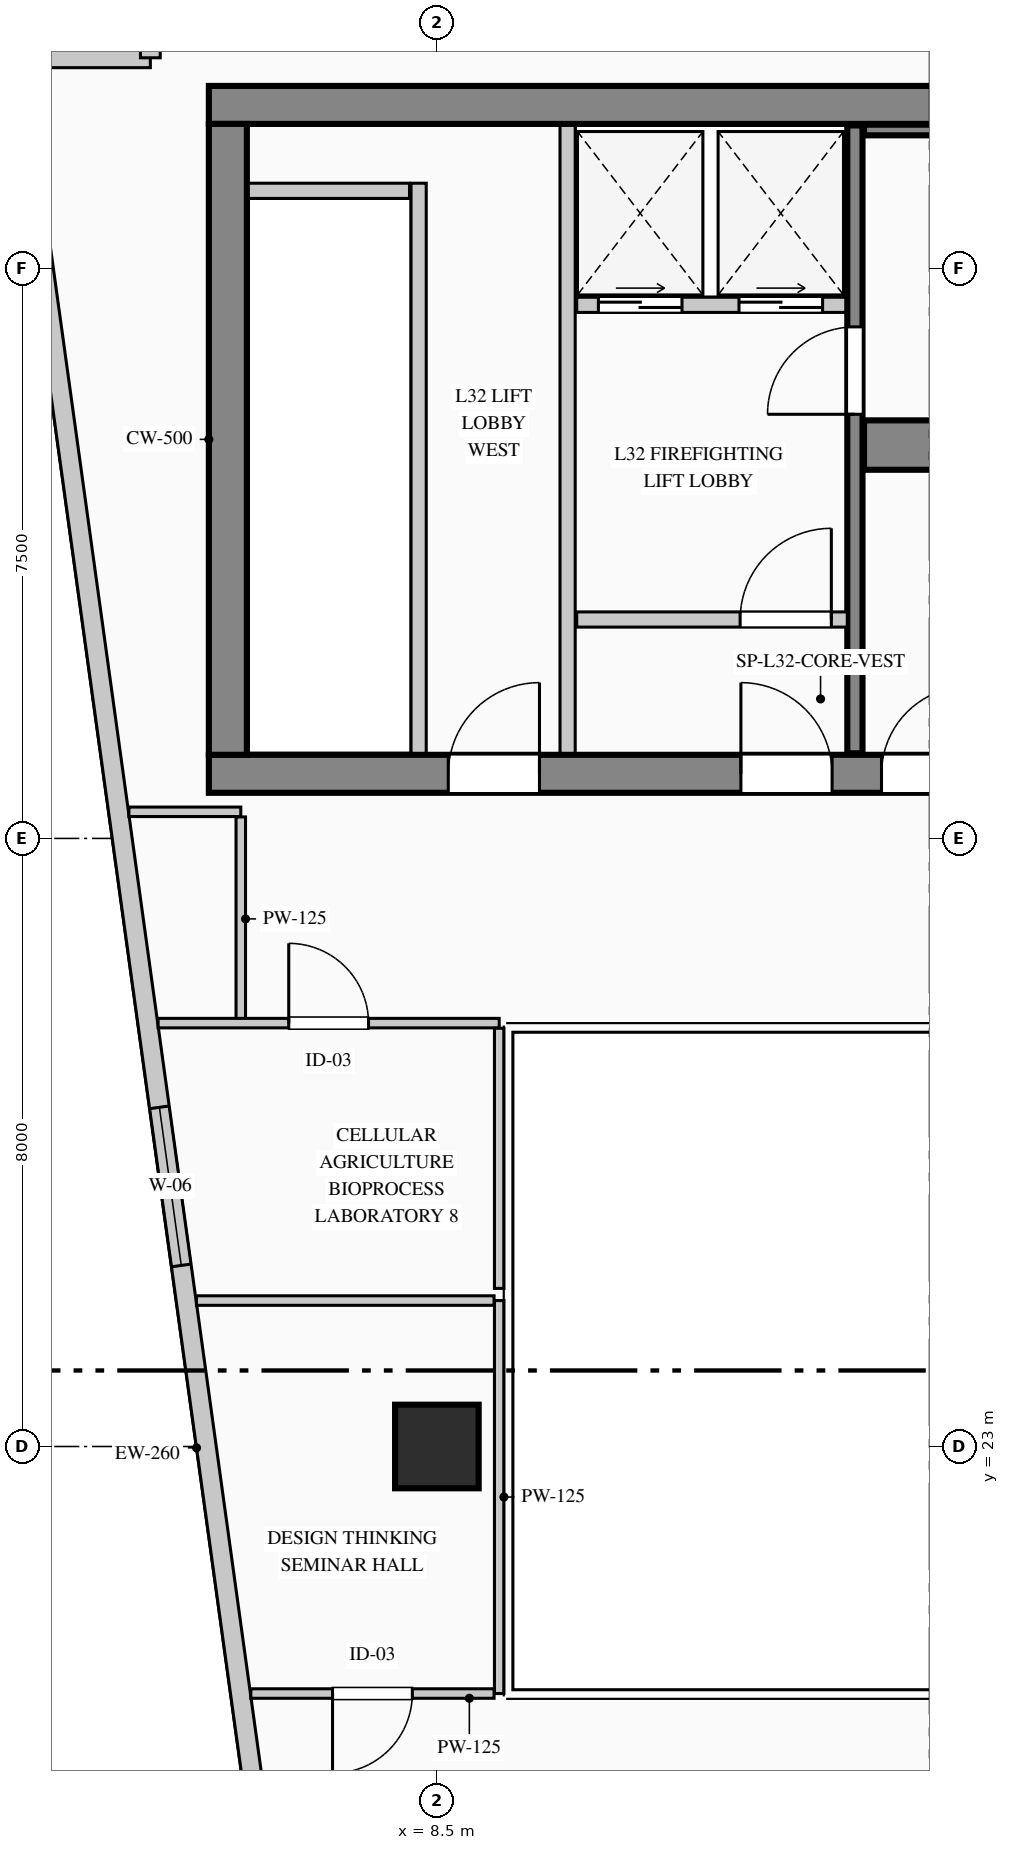
"""IFC4 building model, lengths in metres.
Left out: names, types, materials, properties, quantities, classifications, styles, units other than length and angle.
Written with IfcOpenShell. Run it as: python <this file> out.ifc"""

import sys

from ifc_helpers import new_model, si_unit, direction, frame, frame_2d, origin, origin_2d, place, context, subcontext, project, spatial, rectangle, extrude, element, fill, save


model = new_model("IFC4")
c1 = context("Model", 3, precision=1e-05, world=origin(), true_north=direction((0.0, 1.0)))
c2 = subcontext(c1, "Body", "Model", "MODEL_VIEW")
j1 = project(units=[si_unit("LENGTHUNIT", "METRE"), si_unit("PLANEANGLEUNIT", "RADIAN")], contexts=[c1])
p1 = place(None, origin())
s1 = spatial("IfcSite", under=j1, at=p1, CompositionType="ELEMENT")
p2 = place(p1, origin())
s2 = spatial("IfcBuilding", under=s1, at=p2, CompositionType="ELEMENT")
p3 = place(p2, frame((0.0, 0.0, 139.05)))
s3 = spatial("IfcBuildingStorey", under=s2, at=p3, CompositionType="ELEMENT", Elevation=139.05)
p4 = place(p3, frame((5.5, 40.65, 0.0), z_axis=(0.0, 0.0, 1.0), x_axis=(1.0, 0.0, 0.0)))
e1 = element("IfcWall", 1, at=p4, inside=s3, PredefinedType="SHEAR", context=c2, shape_type="SweptSolid", body=[
    extrude(rectangle(XDim=17.85, YDim=0.5, at=frame_2d((8.925, 0.0))), origin(), (0.0, 0.0, 1.0), 3.95),
])
p5 = place(p4, frame((15.945, 0.0, 0.0)))
e2 = element("IfcOpeningElement", 2, at=p5, cuts=e1, PredefinedType="OPENING", context=c2, shape_type="SweptSolid", body=[
    extrude(rectangle(XDim=1.18, YDim=2.25, at=frame_2d((0.59, 1.125))), frame((0.0, 0.26, 0.0), z_axis=(0.0, -1.0, 0.0), x_axis=(1.0, 0.0, 0.0)), (0.0, 0.0, 1.0), 0.52),
])
p6 = place(p3, frame((5.5, 31.85, 0.0), z_axis=(0.0, 0.0, 1.0), x_axis=(1.0, 0.0, 0.0)))
e3 = element("IfcWall", 3, at=p6, inside=s3, PredefinedType="SHEAR", context=c2, shape_type="SweptSolid", body=[
    extrude(rectangle(XDim=17.85, YDim=0.5, at=frame_2d((8.925, 0.0))), origin(), (0.0, 0.0, 1.0), 3.95),
])
p7 = place(p6, frame((3.15, 0.0, 0.0)))
e4 = element("IfcOpeningElement", 4, at=p7, cuts=e3, PredefinedType="OPENING", context=c2, shape_type="SweptSolid", body=[
    extrude(rectangle(XDim=1.2, YDim=2.2, at=frame_2d((0.6, 1.1))), frame((0.0, 0.26, 0.0), z_axis=(0.0, -1.0, 0.0), x_axis=(1.0, 0.0, 0.0)), (0.0, 0.0, 1.0), 0.52),
])
p8 = place(p6, frame((7.0, 0.0, 0.0)))
e5 = element("IfcOpeningElement", 5, at=p8, cuts=e3, PredefinedType="OPENING", context=c2, shape_type="SweptSolid", body=[
    extrude(rectangle(XDim=1.2, YDim=2.2, at=frame_2d((0.6, 1.1))), frame((0.0, 0.26, 0.0), z_axis=(0.0, -1.0, 0.0), x_axis=(1.0, 0.0, 0.0)), (0.0, 0.0, 1.0), 0.52),
])
p9 = place(p6, frame((8.85, 0.0, 0.0)))
e6 = element("IfcOpeningElement", 6, at=p9, cuts=e3, PredefinedType="OPENING", context=c2, shape_type="SweptSolid", body=[
    extrude(rectangle(XDim=1.15, YDim=2.2, at=frame_2d((0.575, 1.1))), frame((0.0, 0.26, 0.0), z_axis=(0.0, -1.0, 0.0), x_axis=(1.0, 0.0, 0.0)), (0.0, 0.0, 1.0), 0.52),
])
p10 = place(p6, frame((15.95, 0.0, 0.0)))
e7 = element("IfcOpeningElement", 7, at=p10, cuts=e3, PredefinedType="OPENING", context=c2, shape_type="SweptSolid", body=[
    extrude(rectangle(XDim=1.2, YDim=2.2, at=frame_2d((0.6, 1.1))), frame((0.0, 0.26, 0.0), z_axis=(0.0, -1.0, 0.0), x_axis=(1.0, 0.0, 0.0)), (0.0, 0.0, 1.0), 0.52),
])
p11 = place(p3, frame((5.75, 32.1, 0.0), z_axis=(0.0, 0.0, 1.0), x_axis=(0.0, 1.0, 0.0)))
e8 = element("IfcWall", 8, at=p11, inside=s3, PredefinedType="SHEAR", context=c2, shape_type="SweptSolid", body=[
    extrude(rectangle(XDim=8.3, YDim=0.5, at=frame_2d((4.15, 0.0))), origin(), (0.0, 0.0, 1.0), 3.95),
])
p12 = place(p3, frame((14.0, 32.12, 0.0), z_axis=(0.0, 0.0, 1.0), x_axis=(0.0, 1.0, 0.0)))
e9 = element("IfcWall", 9, at=p12, inside=s3, PredefinedType="SHEAR", context=c2, shape_type="SweptSolid", body=[
    extrude(rectangle(XDim=8.26, YDim=0.2, at=frame_2d((4.13, 0.0))), origin(), (0.0, 0.0, 1.0), 3.95),
])
p13 = place(p12, frame((4.46, 0.0, 0.0)))
e10 = element("IfcOpeningElement", 10, at=p13, cuts=e9, PredefinedType="OPENING", context=c2, shape_type="SweptSolid", body=[
    extrude(rectangle(XDim=1.15, YDim=2.2, at=frame_2d((0.575, 1.1))), frame((0.0, 0.11, 0.0), z_axis=(0.0, -1.0, 0.0), x_axis=(1.0, 0.0, 0.0)), (0.0, 0.0, 1.0), 0.22),
])
p14 = place(p3, frame((14.12, 36.175, 0.0), z_axis=(0.0, 0.0, 1.0), x_axis=(1.0, 0.0, 0.0)))
e11 = element("IfcWall", 11, at=p14, inside=s3, PredefinedType="SHEAR", context=c2, shape_type="SweptSolid", body=[
    extrude(rectangle(XDim=7.01, YDim=0.65, at=frame_2d((3.505, 0.0))), origin(), (0.0, 0.0, 1.0), 3.95),
])
p15 = place(p3, frame((14.12, 40.32, 0.0), z_axis=(0.0, 0.0, 1.0), x_axis=(1.0, 0.0, 0.0)))
e12 = element("IfcWall", 12, at=p15, inside=s3, PredefinedType="SHEAR", context=c2, shape_type="SweptSolid", body=[
    extrude(rectangle(XDim=7.01, YDim=0.14, at=frame_2d((3.505, 0.0))), origin(), (0.0, 0.0, 1.0), 3.95),
])
p16 = place(p3, frame((8.5, 23.0, 0.0), z_axis=(0.0, 0.0, 1.0), x_axis=(1.0, 0.0, 0.0)))
e13 = element("IfcColumn", 13, at=p16, inside=s3, PredefinedType="COLUMN", context=c2, shape_type="SweptSolid", body=[
    extrude(rectangle(XDim=1.1, YDim=1.1, at=origin_2d()), origin(), (0.0, 0.0, 1.0), 3.95),
])
p17 = place(p3, frame((7.993, 4.73, 0.0), z_axis=(0.0, 0.0, 1.0), x_axis=(-0.136989009016, 0.990572567462, 0.0)))
e14 = element("IfcWall", 14, at=p17, inside=s3, PredefinedType="STANDARD", context=c2, shape_type="SweptSolid", body=[
    extrude(rectangle(XDim=36.888, YDim=0.26, at=frame_2d((18.444, 0.0))), origin(), (0.0, 0.0, 1.0), 3.69),
])
p18 = place(p17, frame((20.848, 0.0, 0.9)))
e15 = element("IfcOpeningElement", 15, at=p18, cuts=e14, PredefinedType="OPENING", context=c2, shape_type="SweptSolid", body=[
    extrude(rectangle(XDim=2.1, YDim=2.0, at=frame_2d((1.05, 1.0))), frame((0.0, 0.14, 0.0), z_axis=(0.0, -1.0, 0.0), x_axis=(1.0, 0.0, 0.0)), (0.0, 0.0, 1.0), 0.28),
])
p19 = place(p3, frame((2.94, 41.27, 0.0), z_axis=(0.0, 0.0, 1.0), x_axis=(1.0, 0.0, 0.0)))
e16 = element("IfcWall", 16, at=p19, inside=s3, PredefinedType="STANDARD", context=c2, shape_type="SweptSolid", body=[
    extrude(rectangle(XDim=1.79, YDim=0.26, at=frame_2d((0.895, 0.0))), origin(), (0.0, 0.0, 1.0), 3.69),
])
p20 = place(p3, frame((4.73, 41.27, 0.0), z_axis=(0.0, 0.0, 1.0), x_axis=(0.0, 1.0, 0.0)))
e17 = element("IfcWall", 17, at=p20, inside=s3, PredefinedType="STANDARD", context=c2, shape_type="SweptSolid", body=[
    extrude(rectangle(XDim=2.1, YDim=0.26, at=frame_2d((1.05, 0.0))), origin(), (0.0, 0.0, 1.0), 3.69),
])
p21 = place(p3, frame((8.26, 32.12, 0.0), z_axis=(0.0, 0.0, 1.0), x_axis=(0.0, 1.0, 0.0)))
e18 = element("IfcWall", 18, at=p21, inside=s3, PredefinedType="PARTITIONING", context=c2, shape_type="SweptSolid", body=[
    extrude(rectangle(XDim=7.5, YDim=0.2, at=frame_2d((3.75, 0.0))), origin(), (0.0, 0.0, 1.0), 3.69),
])
p22 = place(p3, frame((6.02, 39.52, 0.0), z_axis=(0.0, 0.0, 1.0), x_axis=(1.0, 0.0, 0.0)))
e19 = element("IfcWall", 19, at=p22, inside=s3, PredefinedType="PARTITIONING", context=c2, shape_type="SweptSolid", body=[
    extrude(rectangle(XDim=2.12, YDim=0.2, at=frame_2d((1.06, 0.0))), origin(), (0.0, 0.0, 1.0), 3.69),
])
p23 = place(p3, frame((10.22, 32.12, 0.0), z_axis=(0.0, 0.0, 1.0), x_axis=(0.0, 1.0, 0.0)))
e20 = element("IfcWall", 20, at=p23, inside=s3, PredefinedType="PARTITIONING", context=c2, shape_type="SweptSolid", body=[
    extrude(rectangle(XDim=8.26, YDim=0.2, at=frame_2d((4.13, 0.0))), origin(), (0.0, 0.0, 1.0), 3.69),
])
p24 = place(p3, frame((10.34, 38.02, 0.0), z_axis=(0.0, 0.0, 1.0), x_axis=(1.0, 0.0, 0.0)))
e21 = element("IfcWall", 21, at=p24, inside=s3, PredefinedType="PARTITIONING", context=c2, shape_type="SweptSolid", body=[
    extrude(rectangle(XDim=3.54, YDim=0.2, at=frame_2d((1.77, 0.0))), origin(), (0.0, 0.0, 1.0), 3.69),
])
p25 = place(p24, frame((0.285, 0.0, 0.0)))
e22 = element("IfcOpeningElement", 22, at=p25, cuts=e21, PredefinedType="OPENING", context=c2, shape_type="SweptSolid", body=[
    extrude(rectangle(XDim=1.1, YDim=2.2, at=frame_2d((0.55, 1.1))), frame((0.0, 0.11, 0.0), z_axis=(0.0, -1.0, 0.0), x_axis=(1.0, 0.0, 0.0)), (0.0, 0.0, 1.0), 0.22),
])
p26 = place(p24, frame((2.135, 0.0, 0.0)))
e23 = element("IfcOpeningElement", 23, at=p26, cuts=e21, PredefinedType="OPENING", context=c2, shape_type="SweptSolid", body=[
    extrude(rectangle(XDim=1.1, YDim=2.2, at=frame_2d((0.55, 1.1))), frame((0.0, 0.11, 0.0), z_axis=(0.0, -1.0, 0.0), x_axis=(1.0, 0.0, 0.0)), (0.0, 0.0, 1.0), 0.22),
])
p27 = place(p3, frame((10.34, 33.88, 0.0), z_axis=(0.0, 0.0, 1.0), x_axis=(1.0, 0.0, 0.0)))
e24 = element("IfcWall", 24, at=p27, inside=s3, PredefinedType="PARTITIONING", context=c2, shape_type="SweptSolid", body=[
    extrude(rectangle(XDim=3.56, YDim=0.2, at=frame_2d((1.78, 0.0))), origin(), (0.0, 0.0, 1.0), 3.69),
])
p28 = place(p27, frame((2.15, 0.0, 0.0)))
e25 = element("IfcOpeningElement", 25, at=p28, cuts=e24, PredefinedType="OPENING", context=c2, shape_type="SweptSolid", body=[
    extrude(rectangle(XDim=1.2, YDim=2.2, at=frame_2d((0.6, 1.1))), frame((0.0, 0.11, 0.0), z_axis=(0.0, -1.0, 0.0), x_axis=(1.0, 0.0, 0.0)), (0.0, 0.0, 1.0), 0.22),
])
p29 = place(p3, frame((9.32, 24.92, 0.0), z_axis=(0.0, 0.0, 1.0), x_axis=(0.0, -1.0, 0.0)))
e26 = element("IfcWall", 26, at=p29, inside=s3, PredefinedType="PARTITIONING", context=c2, shape_type="SweptSolid", body=[
    extrude(rectangle(XDim=5.17, YDim=0.125, at=frame_2d((2.585, 0.0))), origin(), (0.0, 0.0, 1.0), 3.475),
])
p30 = place(p3, frame((9.252, 19.75, 0.0), z_axis=(0.0, 0.0, 1.0), x_axis=(-1.0, 0.0, 0.0)))
e27 = element("IfcWall", 27, at=p30, inside=s3, PredefinedType="PARTITIONING", context=c2, shape_type="SweptSolid", body=[
    extrude(rectangle(XDim=3.2, YDim=0.125, at=frame_2d((1.6, 0.0))), origin(), (0.0, 0.0, 1.0), 3.69),
])
p31 = place(p30, frame((1.075, 0.0, 0.0)))
e28 = element("IfcOpeningElement", 28, at=p31, cuts=e27, PredefinedType="OPENING", context=c2, shape_type="SweptSolid", body=[
    extrude(rectangle(XDim=1.05, YDim=2.15, at=frame_2d((0.525, 1.075))), frame((0.0, 0.073, 0.0), z_axis=(0.0, -1.0, 0.0), x_axis=(1.0, 0.0, 0.0)), (0.0, 0.0, 1.0), 0.145),
])
p32 = place(p3, frame((5.337, 24.92, 0.0), z_axis=(0.0, 0.0, 1.0), x_axis=(1.0, 0.0, 0.0)))
e29 = element("IfcWall", 29, at=p32, inside=s3, PredefinedType="PARTITIONING", context=c2, shape_type="SweptSolid", body=[
    extrude(rectangle(XDim=3.916, YDim=0.125, at=frame_2d((1.958, 0.0))), origin(), (0.0, 0.0, 1.0), 3.69),
])
p33 = place(p3, frame((4.448, 31.35, 0.0), z_axis=(0.0, 0.0, 1.0), x_axis=(1.0, 0.0, 0.0)))
e30 = element("IfcWall", 30, at=p33, inside=s3, PredefinedType="PARTITIONING", context=c2, shape_type="SweptSolid", body=[
    extrude(rectangle(XDim=1.472, YDim=0.125, at=frame_2d((0.736, 0.0))), origin(), (0.0, 0.0, 1.0), 3.69),
])
p34 = place(p3, frame((5.92, 31.282, 0.0), z_axis=(0.0, 0.0, 1.0), x_axis=(0.0, -1.0, 0.0)))
e31 = element("IfcWall", 31, at=p34, inside=s3, PredefinedType="PARTITIONING", context=c2, shape_type="SweptSolid", body=[
    extrude(rectangle(XDim=2.682, YDim=0.125, at=frame_2d((1.341, 0.0))), origin(), (0.0, 0.0, 1.0), 3.69),
])
p35 = place(p3, frame((4.832, 28.57, 0.0), z_axis=(0.0, 0.0, 1.0), x_axis=(1.0, 0.0, 0.0)))
e32 = element("IfcWall", 32, at=p35, inside=s3, PredefinedType="PARTITIONING", context=c2, shape_type="SweptSolid", body=[
    extrude(rectangle(XDim=4.488, YDim=0.125, at=frame_2d((2.244, 0.0))), origin(), (0.0, 0.0, 1.0), 3.69),
])
p36 = place(p35, frame((1.719, 0.0, 0.0)))
e33 = element("IfcOpeningElement", 33, at=p36, cuts=e32, PredefinedType="OPENING", context=c2, shape_type="SweptSolid", body=[
    extrude(rectangle(XDim=1.05, YDim=2.15, at=frame_2d((0.525, 1.075))), frame((0.0, 0.073, 0.0), z_axis=(0.0, -1.0, 0.0), x_axis=(1.0, 0.0, 0.0)), (0.0, 0.0, 1.0), 0.145),
])
p37 = place(p3, frame((9.32, 28.502, 0.0), z_axis=(0.0, 0.0, 1.0), x_axis=(0.0, -1.0, 0.0)))
e34 = element("IfcWall", 34, at=p37, inside=s3, PredefinedType="PARTITIONING", context=c2, shape_type="SweptSolid", body=[
    extrude(rectangle(XDim=3.422, YDim=0.125, at=frame_2d((1.711, 0.0))), origin(), (0.0, 0.0, 1.0), 3.475),
])
p38 = place(p18, origin())
e35 = element("IfcWindow", 35, at=p38, inside=s3, PartitioningType="DOUBLE_PANEL_VERTICAL", PredefinedType="WINDOW", context=c2, shape_type="SweptSolid", body=[
    extrude(rectangle(XDim=2.1, YDim=2.0, at=frame_2d((1.05, 1.0))), frame((0.0, 0.03, 0.0), z_axis=(0.0, -1.0, 0.0), x_axis=(1.0, 0.0, 0.0)), (0.0, 0.0, 1.0), 0.06),
])
fill(e15, e35)
p39 = place(p7, origin())
e36 = element("IfcDoor", 36, at=p39, inside=s3, OperationType="SINGLE_SWING_RIGHT", PredefinedType="DOOR", context=c2, shape_type="SweptSolid", body=[
    extrude(rectangle(XDim=1.2, YDim=2.2, at=frame_2d((0.6, 1.1))), frame((0.0, 0.025, 0.0), z_axis=(0.0, -1.0, 0.0), x_axis=(1.0, 0.0, 0.0)), (0.0, 0.0, 1.0), 0.05),
])
fill(e4, e36)
p40 = place(p8, origin())
e37 = element("IfcDoor", 37, at=p40, inside=s3, OperationType="SINGLE_SWING_LEFT", PredefinedType="DOOR", context=c2, shape_type="SweptSolid", body=[
    extrude(rectangle(XDim=1.2, YDim=2.2, at=frame_2d((0.6, 1.1))), frame((0.0, 0.025, 0.0), z_axis=(0.0, -1.0, 0.0), x_axis=(1.0, 0.0, 0.0)), (0.0, 0.0, 1.0), 0.05),
])
fill(e5, e37)
p41 = place(p9, origin())
e38 = element("IfcDoor", 38, at=p41, inside=s3, OperationType="SINGLE_SWING_RIGHT", PredefinedType="DOOR", context=c2, shape_type="SweptSolid", body=[
    extrude(rectangle(XDim=1.15, YDim=2.2, at=frame_2d((0.575, 1.1))), frame((0.0, 0.025, 0.0), z_axis=(0.0, -1.0, 0.0), x_axis=(1.0, 0.0, 0.0)), (0.0, 0.0, 1.0), 0.05),
])
fill(e6, e38)
p42 = place(p28, origin())
e39 = element("IfcDoor", 39, at=p42, inside=s3, OperationType="SINGLE_SWING_RIGHT", PredefinedType="DOOR", context=c2, shape_type="SweptSolid", body=[
    extrude(rectangle(XDim=1.2, YDim=2.2, at=frame_2d((0.6, 1.1))), frame((0.0, 0.025, 0.0), z_axis=(0.0, -1.0, 0.0), x_axis=(1.0, 0.0, 0.0)), (0.0, 0.0, 1.0), 0.05),
])
fill(e25, e39)
p43 = place(p13, origin())
e40 = element("IfcDoor", 40, at=p43, inside=s3, OperationType="SINGLE_SWING_LEFT", PredefinedType="DOOR", context=c2, shape_type="SweptSolid", body=[
    extrude(rectangle(XDim=1.15, YDim=2.2, at=frame_2d((0.575, 1.1))), frame((0.0, 0.025, 0.0), z_axis=(0.0, -1.0, 0.0), x_axis=(1.0, 0.0, 0.0)), (0.0, 0.0, 1.0), 0.05),
])
fill(e10, e40)
p44 = place(p25, origin())
e41 = element("IfcDoor", 41, at=p44, inside=s3, OperationType="DOUBLE_DOOR_SLIDING", PredefinedType="DOOR", context=c2, shape_type="SweptSolid", body=[
    extrude(rectangle(XDim=1.1, YDim=2.2, at=frame_2d((0.55, 1.1))), frame((0.0, 0.025, 0.0), z_axis=(0.0, -1.0, 0.0), x_axis=(1.0, 0.0, 0.0)), (0.0, 0.0, 1.0), 0.05),
])
fill(e22, e41)
p45 = place(p26, origin())
e42 = element("IfcDoor", 42, at=p45, inside=s3, OperationType="DOUBLE_DOOR_SLIDING", PredefinedType="DOOR", context=c2, shape_type="SweptSolid", body=[
    extrude(rectangle(XDim=1.1, YDim=2.2, at=frame_2d((0.55, 1.1))), frame((0.0, 0.025, 0.0), z_axis=(0.0, -1.0, 0.0), x_axis=(1.0, 0.0, 0.0)), (0.0, 0.0, 1.0), 0.05),
])
fill(e23, e42)
p46 = place(p31, origin())
e43 = element("IfcDoor", 43, at=p46, inside=s3, OperationType="SINGLE_SWING_RIGHT", PredefinedType="DOOR", context=c2, shape_type="SweptSolid", body=[
    extrude(rectangle(XDim=1.05, YDim=2.15, at=frame_2d((0.525, 1.075))), frame((0.0, 0.025, 0.0), z_axis=(0.0, -1.0, 0.0), x_axis=(1.0, 0.0, 0.0)), (0.0, 0.0, 1.0), 0.05),
])
fill(e28, e43)
p47 = place(p36, origin())
e44 = element("IfcDoor", 44, at=p47, inside=s3, OperationType="SINGLE_SWING_LEFT", PredefinedType="DOOR", context=c2, shape_type="SweptSolid", body=[
    extrude(rectangle(XDim=1.05, YDim=2.15, at=frame_2d((0.525, 1.075))), frame((0.0, 0.025, 0.0), z_axis=(0.0, -1.0, 0.0), x_axis=(1.0, 0.0, 0.0)), (0.0, 0.0, 1.0), 0.05),
])
fill(e33, e44)
save(model, sys.argv[1])
